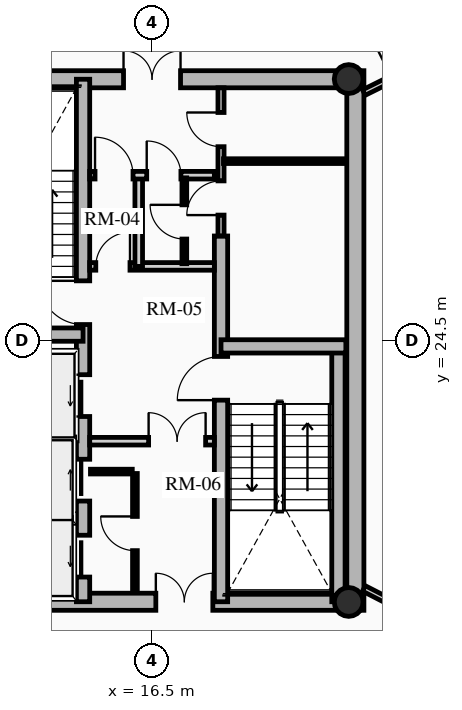
"""IFC4 building model, lengths in metres.
Left out: names, types, materials, properties, quantities, classifications, styles, units other than length and angle.
Written with IfcOpenShell. Run it as: python <this file> out.ifc"""

import sys

from ifc_helpers import new_model, si_unit, direction, frame, frame_2d, origin, origin_2d, place, context, subcontext, project, spatial, rectangle, hollow_circle, extrude, source, transform, mapped, element, fill, save


model = new_model("IFC4")
c1 = context("Model", 3, precision=1e-05, world=origin(), true_north=direction((0.0, 1.0)))
c2 = subcontext(c1, "Body", "Model", "MODEL_VIEW")
j1 = project(units=[si_unit("LENGTHUNIT", "METRE"), si_unit("PLANEANGLEUNIT", "RADIAN")], contexts=[c1])
p1 = place(None, origin())
s1 = spatial("IfcSite", under=j1, at=p1, CompositionType="ELEMENT")
p2 = place(p1, origin())
s2 = spatial("IfcBuilding", under=s1, at=p2, CompositionType="ELEMENT")
p3 = place(p2, frame((0.0, 0.0, 140.32)))
s3 = spatial("IfcBuildingStorey", under=s2, at=p3, CompositionType="ELEMENT", Elevation=140.32)
p4 = place(p3, frame((21.85, 17.4, 0.0), z_axis=(0.0, 0.0, 1.0), x_axis=(0.0, 1.0, 0.0)))
e1 = element("IfcWall", 1, at=p4, inside=s3, PredefinedType="SHEAR", context=c2, shape_type="SweptSolid", body=[
    extrude(rectangle(XDim=14.2, YDim=0.45, at=frame_2d((7.1, 0.0))), origin(), (0.0, 0.0, 1.0), 3.72),
])
p5 = place(p3, frame((11.15, 17.625, 0.0), z_axis=(0.0, 0.0, 1.0), x_axis=(1.0, 0.0, 0.0)))
e2 = element("IfcWall", 2, at=p5, inside=s3, PredefinedType="SHEAR", context=c2, shape_type="SweptSolid", body=[
    extrude(rectangle(XDim=10.7, YDim=0.45, at=frame_2d((5.35, 0.0))), origin(), (0.0, 0.0, 1.0), 3.72),
])
m1 = source(origin(), c2, "Body", "SweptSolid", [
    extrude(rectangle(XDim=1.5, YDim=2.02, at=frame_2d((0.75, 1.01))), frame((0.0, 0.235, 0.0), z_axis=(0.0, -1.0, 0.0), x_axis=(1.0, 0.0, 0.0)), (0.0, 0.0, 1.0), 0.47),
])
p6 = place(p5, frame((5.45, 0.0, 0.0)))
e3 = element("IfcOpeningElement", 3, at=p6, cuts=e2, PredefinedType="OPENING", context=c2, shape_type="MappedRepresentation", body=[
    mapped(m1, transform((0.0, 0.0, 0.0), x_axis=(1.0, 0.0, 0.0), y_axis=(0.0, 1.0, 0.0), z_axis=(0.0, 0.0, 1.0), scale=1.0)),
])
p7 = place(p3, frame((11.15, 31.375, 0.0), z_axis=(0.0, 0.0, 1.0), x_axis=(1.0, 0.0, 0.0)))
e4 = element("IfcWall", 4, at=p7, inside=s3, PredefinedType="SHEAR", context=c2, shape_type="SweptSolid", body=[
    extrude(rectangle(XDim=10.7, YDim=0.45, at=frame_2d((5.35, 0.0))), origin(), (0.0, 0.0, 1.0), 3.72),
])
p8 = place(p7, frame((4.6, 0.0, 0.0)))
e5 = element("IfcOpeningElement", 5, at=p8, cuts=e4, PredefinedType="OPENING", context=c2, shape_type="MappedRepresentation", body=[
    mapped(m1, transform((0.0, 0.0, 0.0), x_axis=(1.0, 0.0, 0.0), y_axis=(0.0, 1.0, 0.0), z_axis=(0.0, 0.0, 1.0), scale=1.0)),
])
p9 = place(p3, frame((14.685, 17.625, 0.0), z_axis=(0.0, 0.0, 1.0), x_axis=(0.0, 1.0, 0.0)))
e6 = element("IfcWall", 6, at=p9, inside=s3, PredefinedType="SHEAR", context=c2, shape_type="SweptSolid", body=[
    extrude(rectangle(XDim=13.75, YDim=0.35, at=frame_2d((6.875, 0.0))), origin(), (0.0, 0.0, 1.0), 3.72),
])
m2 = source(origin(), c2, "Body", "SweptSolid", [
    extrude(rectangle(XDim=1.1, YDim=2.015, at=frame_2d((0.55, 1.007))), frame((0.0, 0.185, 0.0), z_axis=(0.0, -1.0, 0.0), x_axis=(1.0, 0.0, 0.0)), (0.0, 0.0, 1.0), 0.37),
])
p10 = place(p9, frame((4.875, 0.0, 0.0)))
e7 = element("IfcOpeningElement", 7, at=p10, cuts=e6, PredefinedType="OPENING", context=c2, shape_type="MappedRepresentation", body=[
    mapped(m2, transform((0.0, 0.0, 0.0), x_axis=(1.0, 0.0, 0.0), y_axis=(0.0, 1.0, 0.0), z_axis=(0.0, 0.0, 1.0), scale=1.0)),
])
p11 = place(p9, frame((0.65, 0.0, 0.0)))
e8 = element("IfcOpeningElement", 8, at=p11, cuts=e6, PredefinedType="OPENING", context=c2, shape_type="MappedRepresentation", body=[
    mapped(m2, transform((0.0, 0.0, 0.0), x_axis=(1.0, 0.0, 0.0), y_axis=(0.0, 1.0, 0.0), z_axis=(0.0, 0.0, 1.0), scale=1.0)),
])
p12 = place(p9, frame((2.65, 0.0, 0.0)))
e9 = element("IfcOpeningElement", 9, at=p12, cuts=e6, PredefinedType="OPENING", context=c2, shape_type="MappedRepresentation", body=[
    mapped(m2, transform((0.0, 0.0, 0.0), x_axis=(1.0, 0.0, 0.0), y_axis=(0.0, 1.0, 0.0), z_axis=(0.0, 0.0, 1.0), scale=1.0)),
])
m3 = source(origin(), c2, "Body", "SweptSolid", [
    extrude(rectangle(XDim=1.15, YDim=2.02, at=frame_2d((0.575, 1.01))), frame((0.0, 0.185, 0.0), z_axis=(0.0, -1.0, 0.0), x_axis=(1.0, 0.0, 0.0)), (0.0, 0.0, 1.0), 0.37),
])
p13 = place(p9, frame((7.295, 0.0, 0.0)))
e10 = element("IfcOpeningElement", 10, at=p13, cuts=e6, PredefinedType="OPENING", context=c2, shape_type="MappedRepresentation", body=[
    mapped(m3, transform((0.0, 0.0, 0.0), x_axis=(1.0, 0.0, 0.0), y_axis=(0.0, 1.0, 0.0), z_axis=(0.0, 0.0, 1.0), scale=1.0)),
])
p14 = place(p3, frame((18.315, 17.625, 0.0), z_axis=(0.0, 0.0, 1.0), x_axis=(0.0, 1.0, 0.0)))
e11 = element("IfcWall", 11, at=p14, inside=s3, PredefinedType="SHEAR", context=c2, shape_type="SweptSolid", body=[
    extrude(rectangle(XDim=9.625, YDim=0.35, at=frame_2d((4.812, 0.0))), origin(), (0.0, 0.0, 1.0), 3.72),
])
p15 = place(p14, frame((5.305, 0.0, 0.0)))
e12 = element("IfcOpeningElement", 12, at=p15, cuts=e11, PredefinedType="OPENING", context=c2, shape_type="MappedRepresentation", body=[
    mapped(m3, transform((0.0, 0.0, 0.0), x_axis=(1.0, 0.0, 0.0), y_axis=(0.0, 1.0, 0.0), z_axis=(0.0, 0.0, 1.0), scale=1.0)),
])
p16 = place(p3, frame((11.4, 24.655, 0.0), z_axis=(0.0, 0.0, 1.0), x_axis=(1.0, 0.0, 0.0)))
e13 = element("IfcWall", 13, at=p16, inside=s3, PredefinedType="SHEAR", context=c2, shape_type="SweptSolid", body=[
    extrude(rectangle(XDim=3.285, YDim=0.35, at=frame_2d((1.643, 0.0))), origin(), (0.0, 0.0, 1.0), 3.72),
])
p17 = place(p3, frame((21.405, 17.625, 0.0), z_axis=(0.0, 0.0, 1.0), x_axis=(0.0, 1.0, 0.0)))
e14 = element("IfcWall", 14, at=p17, inside=s3, PredefinedType="SHEAR", context=c2, shape_type="SweptSolid", body=[
    extrude(rectangle(XDim=6.72, YDim=0.35, at=frame_2d((3.36, 0.0))), origin(), (0.0, 0.0, 1.0), 3.72),
])
p18 = place(p3, frame((18.315, 24.345, 0.0), z_axis=(0.0, 0.0, 1.0), x_axis=(1.0, 0.0, 0.0)))
e15 = element("IfcWall", 15, at=p18, inside=s3, PredefinedType="SHEAR", context=c2, shape_type="SweptSolid", body=[
    extrude(rectangle(XDim=3.285, YDim=0.35, at=frame_2d((1.643, 0.0))), origin(), (0.0, 0.0, 1.0), 3.72),
])
for number, where, z_axis, x_axis in (
    (16, (21.675, 17.62, 0.0), (0.0, 0.0, 1.0), (1.0, 0.0, 0.0)),
    (17, (21.675, 31.38, 0.0), (0.0, 0.0, 1.0), (1.0, 0.0, 0.0)),
):
    element("IfcColumn", number, at=place(p3, frame(where, z_axis=z_axis, x_axis=x_axis)), inside=s3, PredefinedType="COLUMN", context=c2, shape_type="SweptSolid", body=[
        extrude(hollow_circle(Radius=0.38, WallThickness=0.032, at=origin_2d()), origin(), (0.0, 0.0, 1.0), 3.72),
    ])
for number, where, z_axis, x_axis in (
    (18, (11.52, 21.8, 0.0), (0.0, 0.0, 1.0), (1.0, 0.0, 0.0)),
    (19, (11.52, 19.825, 0.0), (0.0, 0.0, 1.0), (1.0, 0.0, 0.0)),
):
    element("IfcWall", number, at=place(p3, frame(where, z_axis=z_axis, x_axis=x_axis)), inside=s3, PredefinedType="SHEAR", context=c2, shape_type="SweptSolid", body=[
        extrude(rectangle(XDim=2.97, YDim=0.2, at=frame_2d((1.485, 0.0))), origin(), (0.0, 0.0, 1.0), 3.72),
    ])
p19 = place(p3, frame((14.86, 21.85, 0.0), z_axis=(0.0, 0.0, 1.0), x_axis=(1.0, 0.0, 0.0)))
e20 = element("IfcWall", 20, at=p19, inside=s3, PredefinedType="PARTITIONING", context=c2, shape_type="SweptSolid", body=[
    extrude(rectangle(XDim=3.28, YDim=0.2, at=frame_2d((1.64, 0.0))), origin(), (0.0, 0.0, 1.0), 3.465),
])
m4 = source(origin(), c2, "Body", "SweptSolid", [
    extrude(rectangle(XDim=1.5, YDim=2.02, at=frame_2d((0.75, 1.01))), frame((0.0, 0.11, 0.0), z_axis=(0.0, -1.0, 0.0), x_axis=(1.0, 0.0, 0.0)), (0.0, 0.0, 1.0), 0.22),
])
p20 = place(p19, frame((1.55, 0.0, 0.0)))
e21 = element("IfcOpeningElement", 21, at=p20, cuts=e20, PredefinedType="OPENING", context=c2, shape_type="MappedRepresentation", body=[
    mapped(m4, transform((0.0, 0.0, 0.0), x_axis=(1.0, 0.0, 0.0), y_axis=(0.0, 1.0, 0.0), z_axis=(0.0, 0.0, 1.0), scale=1.0)),
])
p21 = place(p3, frame((14.86, 26.45, 0.0), z_axis=(0.0, 0.0, 1.0), x_axis=(1.0, 0.0, 0.0)))
e22 = element("IfcWall", 22, at=p21, inside=s3, PredefinedType="PARTITIONING", context=c2, shape_type="SweptSolid", body=[
    extrude(rectangle(XDim=3.28, YDim=0.2, at=frame_2d((1.64, 0.0))), origin(), (0.0, 0.0, 1.0), 3.465),
])
m5 = source(origin(), c2, "Body", "SweptSolid", [
    extrude(rectangle(XDim=0.9, YDim=2.005, at=frame_2d((0.45, 1.002))), frame((0.0, 0.11, 0.0), z_axis=(0.0, -1.0, 0.0), x_axis=(1.0, 0.0, 0.0)), (0.0, 0.0, 1.0), 0.22),
])
p22 = place(p21, frame((0.16, 0.0, 0.0)))
e23 = element("IfcOpeningElement", 23, at=p22, cuts=e22, PredefinedType="OPENING", context=c2, shape_type="MappedRepresentation", body=[
    mapped(m5, transform((0.0, 0.0, 0.0), x_axis=(1.0, 0.0, 0.0), y_axis=(0.0, 1.0, 0.0), z_axis=(0.0, 0.0, 1.0), scale=1.0)),
])
p23 = place(p3, frame((16.15, 26.45, 0.0), z_axis=(0.0, 0.0, 1.0), x_axis=(0.0, 1.0, 0.0)))
e24 = element("IfcWall", 24, at=p23, inside=s3, PredefinedType="PARTITIONING", context=c2, shape_type="SweptSolid", body=[
    extrude(rectangle(XDim=2.4, YDim=0.2, at=frame_2d((1.2, 0.0))), origin(), (0.0, 0.0, 1.0), 3.465),
])
p24 = place(p3, frame((14.86, 28.85, 0.0), z_axis=(0.0, 0.0, 1.0), x_axis=(1.0, 0.0, 0.0)))
e25 = element("IfcWall", 25, at=p24, inside=s3, PredefinedType="PARTITIONING", context=c2, shape_type="SweptSolid", body=[
    extrude(rectangle(XDim=3.28, YDim=0.2, at=frame_2d((1.64, 0.0))), origin(), (0.0, 0.0, 1.0), 3.465),
])
m6 = source(origin(), c2, "Body", "SweptSolid", [
    extrude(rectangle(XDim=1.0, YDim=2.015, at=frame_2d((0.5, 1.007))), frame((0.0, 0.11, 0.0), z_axis=(0.0, -1.0, 0.0), x_axis=(1.0, 0.0, 0.0)), (0.0, 0.0, 1.0), 0.22),
])
p25 = place(p24, frame((0.14, 0.0, 0.0)))
e26 = element("IfcOpeningElement", 26, at=p25, cuts=e25, PredefinedType="OPENING", context=c2, shape_type="MappedRepresentation", body=[
    mapped(m6, transform((0.0, 0.0, 0.0), x_axis=(1.0, 0.0, 0.0), y_axis=(0.0, 1.0, 0.0), z_axis=(0.0, 0.0, 1.0), scale=1.0)),
])
p26 = place(p24, frame((1.5, 0.0, 0.0)))
e27 = element("IfcOpeningElement", 27, at=p26, cuts=e25, PredefinedType="OPENING", context=c2, shape_type="MappedRepresentation", body=[
    mapped(m5, transform((0.0, 0.0, 0.0), x_axis=(1.0, 0.0, 0.0), y_axis=(0.0, 1.0, 0.0), z_axis=(0.0, 0.0, 1.0), scale=1.0)),
])
p27 = place(p3, frame((16.05, 17.92, 0.0), z_axis=(0.0, 0.0, 1.0), x_axis=(0.0, 1.0, 0.0)))
e28 = element("IfcWall", 28, at=p27, inside=s3, PredefinedType="PARTITIONING", context=c2, shape_type="SweptSolid", body=[
    extrude(rectangle(XDim=3.08, YDim=0.125, at=frame_2d((1.54, 0.0))), origin(), (0.0, 0.0, 1.0), 3.465),
])
m7 = source(origin(), c2, "Body", "SweptSolid", [
    extrude(rectangle(XDim=0.9, YDim=2.005, at=frame_2d((0.45, 1.002))), frame((0.0, 0.073, 0.0), z_axis=(0.0, -1.0, 0.0), x_axis=(1.0, 0.0, 0.0)), (0.0, 0.0, 1.0), 0.145),
])
p28 = place(p27, frame((1.05, 0.0, 0.0)))
e29 = element("IfcOpeningElement", 29, at=p28, cuts=e28, PredefinedType="OPENING", context=c2, shape_type="MappedRepresentation", body=[
    mapped(m7, transform((0.0, 0.0, 0.0), x_axis=(1.0, 0.0, 0.0), y_axis=(0.0, 1.0, 0.0), z_axis=(0.0, 0.0, 1.0), scale=1.0)),
])
p29 = place(p3, frame((14.88, 21.05, 0.0), z_axis=(0.0, 0.0, 1.0), x_axis=(1.0, 0.0, 0.0)))
e30 = element("IfcWall", 30, at=p29, inside=s3, PredefinedType="PARTITIONING", context=c2, shape_type="SweptSolid", body=[
    extrude(rectangle(XDim=1.1, YDim=0.125, at=frame_2d((0.55, 0.0))), origin(), (0.0, 0.0, 1.0), 3.465),
])
p30 = place(p3, frame((17.35, 26.52, 0.0), z_axis=(0.0, 0.0, 1.0), x_axis=(0.0, 1.0, 0.0)))
e31 = element("IfcWall", 31, at=p30, inside=s3, PredefinedType="PARTITIONING", context=c2, shape_type="SweptSolid", body=[
    extrude(rectangle(XDim=2.26, YDim=0.125, at=frame_2d((1.13, 0.0))), origin(), (0.0, 0.0, 1.0), 3.465),
])
p31 = place(p30, frame((0.65, 0.0, 0.0)))
e32 = element("IfcOpeningElement", 32, at=p31, cuts=e31, PredefinedType="OPENING", context=c2, shape_type="MappedRepresentation", body=[
    mapped(m7, transform((0.0, 0.0, 0.0), x_axis=(1.0, 0.0, 0.0), y_axis=(0.0, 1.0, 0.0), z_axis=(0.0, 0.0, 1.0), scale=1.0)),
])
p32 = place(p3, frame((18.315, 27.25, 0.0), z_axis=(0.0, 0.0, 1.0), x_axis=(0.0, 1.0, 0.0)))
e33 = element("IfcWall", 33, at=p32, inside=s3, PredefinedType="PARTITIONING", context=c2, shape_type="SweptSolid", body=[
    extrude(rectangle(XDim=3.9, YDim=0.16, at=frame_2d((1.95, 0.0))), origin(), (0.0, 0.0, 1.0), 3.465),
])
m8 = source(origin(), c2, "Body", "SweptSolid", [
    extrude(rectangle(XDim=0.9, YDim=2.005, at=frame_2d((0.45, 1.002))), frame((0.0, 0.09, 0.0), z_axis=(0.0, -1.0, 0.0), x_axis=(1.0, 0.0, 0.0)), (0.0, 0.0, 1.0), 0.18),
])
p33 = place(p32, frame((0.55, 0.0, 0.0)))
e34 = element("IfcOpeningElement", 34, at=p33, cuts=e33, PredefinedType="OPENING", context=c2, shape_type="MappedRepresentation", body=[
    mapped(m8, transform((0.0, 0.0, 0.0), x_axis=(1.0, 0.0, 0.0), y_axis=(0.0, 1.0, 0.0), z_axis=(0.0, 0.0, 1.0), scale=1.0)),
])
p34 = place(p32, frame((2.35, 0.0, 0.0)))
e35 = element("IfcOpeningElement", 35, at=p34, cuts=e33, PredefinedType="OPENING", context=c2, shape_type="MappedRepresentation", body=[
    mapped(m8, transform((0.0, 0.0, 0.0), x_axis=(1.0, 0.0, 0.0), y_axis=(0.0, 1.0, 0.0), z_axis=(0.0, 0.0, 1.0), scale=1.0)),
])
p35 = place(p3, frame((18.38, 29.22, 0.0), z_axis=(0.0, 0.0, 1.0), x_axis=(1.0, 0.0, 0.0)))
e36 = element("IfcWall", 36, at=p35, inside=s3, PredefinedType="PARTITIONING", context=c2, shape_type="SweptSolid", body=[
    extrude(rectangle(XDim=3.22, YDim=0.125, at=frame_2d((1.61, 0.0))), origin(), (0.0, 0.0, 1.0), 3.002),
])
p36 = place(p3, frame((22.075, 31.025, 0.0), z_axis=(0.0, 0.0, 1.0), x_axis=(0.8959286695, 0.444197950432, 0.0)))
e37 = element("IfcWall", 37, at=p36, inside=s3, PredefinedType="PARTITIONING", context=c2, shape_type="SweptSolid", body=[
    extrude(rectangle(XDim=2.074, YDim=0.16, at=frame_2d((1.037, 0.0))), origin(), (0.0, 0.0, 1.0), 3.035),
])
m9 = source(origin(), c2, "Body", "SweptSolid", [
    extrude(rectangle(XDim=1.05, YDim=2.015, at=frame_2d((0.525, 1.007))), frame((0.0, 0.09, 0.0), z_axis=(0.0, -1.0, 0.0), x_axis=(1.0, 0.0, 0.0)), (0.0, 0.0, 1.0), 0.18),
])
p37 = place(p36, frame((0.824, 0.0, 0.0)))
e38 = element("IfcOpeningElement", 38, at=p37, cuts=e37, PredefinedType="OPENING", context=c2, shape_type="MappedRepresentation", body=[
    mapped(m9, transform((0.0, 0.0, 0.0), x_axis=(1.0, 0.0, 0.0), y_axis=(0.0, 1.0, 0.0), z_axis=(0.0, 0.0, 1.0), scale=1.0)),
])
p38 = place(p3, frame((22.075, 17.975, 0.0), z_axis=(0.0, 0.0, 1.0), x_axis=(0.889835034782, -0.456282380632, 0.0)))
e39 = element("IfcWall", 39, at=p38, inside=s3, PredefinedType="PARTITIONING", context=c2, shape_type="SweptSolid", body=[
    extrude(rectangle(XDim=2.17, YDim=0.16, at=frame_2d((1.085, 0.0))), origin(), (0.0, 0.0, 1.0), 3.035),
])
p39 = place(p38, frame((0.92, 0.0, 0.0)))
e40 = element("IfcOpeningElement", 40, at=p39, cuts=e39, PredefinedType="OPENING", context=c2, shape_type="MappedRepresentation", body=[
    mapped(m9, transform((0.0, 0.0, 0.0), x_axis=(1.0, 0.0, 0.0), y_axis=(0.0, 1.0, 0.0), z_axis=(0.0, 0.0, 1.0), scale=1.0)),
])
m10 = source(origin(), c2, "Body", "SweptSolid", [
    extrude(rectangle(XDim=1.1, YDim=2.015, at=frame_2d((0.55, 1.007))), frame((0.0, 0.025, 0.0), z_axis=(0.0, -1.0, 0.0), x_axis=(1.0, 0.0, 0.0)), (0.0, 0.0, 1.0), 0.05),
])
p40 = place(p10, origin())
e41 = element("IfcDoor", 41, at=p40, inside=s3, OperationType="SLIDING_TO_LEFT", PredefinedType="DOOR", context=c2, shape_type="MappedRepresentation", body=[
    mapped(m10, transform((0.0, 0.0, 0.0), x_axis=(1.0, 0.0, 0.0), y_axis=(0.0, 1.0, 0.0), z_axis=(0.0, 0.0, 1.0), scale=1.0)),
])
fill(e7, e41)
p41 = place(p11, origin())
e42 = element("IfcDoor", 42, at=p41, inside=s3, OperationType="SLIDING_TO_LEFT", PredefinedType="DOOR", context=c2, shape_type="MappedRepresentation", body=[
    mapped(m10, transform((0.0, 0.0, 0.0), x_axis=(1.0, 0.0, 0.0), y_axis=(0.0, 1.0, 0.0), z_axis=(0.0, 0.0, 1.0), scale=1.0)),
])
fill(e8, e42)
p42 = place(p12, origin())
e43 = element("IfcDoor", 43, at=p42, inside=s3, OperationType="SLIDING_TO_RIGHT", PredefinedType="DOOR", context=c2, shape_type="MappedRepresentation", body=[
    mapped(m10, transform((0.0, 0.0, 0.0), x_axis=(1.0, 0.0, 0.0), y_axis=(0.0, 1.0, 0.0), z_axis=(0.0, 0.0, 1.0), scale=1.0)),
])
fill(e9, e43)
m11 = source(origin(), c2, "Body", "SweptSolid", [
    extrude(rectangle(XDim=1.15, YDim=2.02, at=frame_2d((0.575, 1.01))), frame((0.0, 0.025, 0.0), z_axis=(0.0, -1.0, 0.0), x_axis=(1.0, 0.0, 0.0)), (0.0, 0.0, 1.0), 0.05),
])
p43 = place(p13, origin())
e44 = element("IfcDoor", 44, at=p43, inside=s3, OperationType="SINGLE_SWING_RIGHT", PredefinedType="DOOR", context=c2, shape_type="MappedRepresentation", body=[
    mapped(m11, transform((0.0, 0.0, 0.0), x_axis=(1.0, 0.0, 0.0), y_axis=(0.0, 1.0, 0.0), z_axis=(0.0, 0.0, 1.0), scale=1.0)),
])
fill(e10, e44)
p44 = place(p15, origin())
e45 = element("IfcDoor", 45, at=p44, inside=s3, OperationType="SINGLE_SWING_LEFT", PredefinedType="DOOR", context=c2, shape_type="MappedRepresentation", body=[
    mapped(m11, transform((0.0, 0.0, 0.0), x_axis=(1.0, 0.0, 0.0), y_axis=(0.0, 1.0, 0.0), z_axis=(0.0, 0.0, 1.0), scale=1.0)),
])
fill(e12, e45)
m12 = source(origin(), c2, "Body", "SweptSolid", [
    extrude(rectangle(XDim=1.5, YDim=2.02, at=frame_2d((0.75, 1.01))), frame((0.0, 0.025, 0.0), z_axis=(0.0, -1.0, 0.0), x_axis=(1.0, 0.0, 0.0)), (0.0, 0.0, 1.0), 0.05),
])
p45 = place(p8, origin())
e46 = element("IfcDoor", 46, at=p45, inside=s3, OperationType="DOUBLE_DOOR_SINGLE_SWING", PredefinedType="DOOR", context=c2, shape_type="MappedRepresentation", body=[
    mapped(m12, transform((0.0, 0.0, 0.0), x_axis=(1.0, 0.0, 0.0), y_axis=(0.0, 1.0, 0.0), z_axis=(0.0, 0.0, 1.0), scale=1.0)),
])
fill(e5, e46)
p46 = place(p6, origin())
e47 = element("IfcDoor", 47, at=p46, inside=s3, OperationType="DOUBLE_DOOR_SINGLE_SWING", PredefinedType="DOOR", context=c2, shape_type="MappedRepresentation", body=[
    mapped(m12, transform((0.0, 0.0, 0.0), x_axis=(1.0, 0.0, 0.0), y_axis=(0.0, 1.0, 0.0), z_axis=(0.0, 0.0, 1.0), scale=1.0)),
])
fill(e3, e47)
p47 = place(p20, origin())
e48 = element("IfcDoor", 48, at=p47, inside=s3, OperationType="DOUBLE_DOOR_SINGLE_SWING", PredefinedType="DOOR", context=c2, shape_type="MappedRepresentation", body=[
    mapped(m12, transform((0.0, 0.0, 0.0), x_axis=(1.0, 0.0, 0.0), y_axis=(0.0, 1.0, 0.0), z_axis=(0.0, 0.0, 1.0), scale=1.0)),
])
fill(e21, e48)
m13 = source(origin(), c2, "Body", "SweptSolid", [
    extrude(rectangle(XDim=0.9, YDim=2.005, at=frame_2d((0.45, 1.002))), frame((0.0, 0.025, 0.0), z_axis=(0.0, -1.0, 0.0), x_axis=(1.0, 0.0, 0.0)), (0.0, 0.0, 1.0), 0.05),
])
p48 = place(p22, origin())
e49 = element("IfcDoor", 49, at=p48, inside=s3, OperationType="SINGLE_SWING_RIGHT", PredefinedType="DOOR", context=c2, shape_type="MappedRepresentation", body=[
    mapped(m13, transform((0.0, 0.0, 0.0), x_axis=(1.0, 0.0, 0.0), y_axis=(0.0, 1.0, 0.0), z_axis=(0.0, 0.0, 1.0), scale=1.0)),
])
fill(e23, e49)
m14 = source(origin(), c2, "Body", "SweptSolid", [
    extrude(rectangle(XDim=1.0, YDim=2.015, at=frame_2d((0.5, 1.007))), frame((0.0, 0.025, 0.0), z_axis=(0.0, -1.0, 0.0), x_axis=(1.0, 0.0, 0.0)), (0.0, 0.0, 1.0), 0.05),
])
p49 = place(p25, origin())
e50 = element("IfcDoor", 50, at=p49, inside=s3, OperationType="SINGLE_SWING_LEFT", PredefinedType="DOOR", context=c2, shape_type="MappedRepresentation", body=[
    mapped(m14, transform((0.0, 0.0, 0.0), x_axis=(1.0, 0.0, 0.0), y_axis=(0.0, 1.0, 0.0), z_axis=(0.0, 0.0, 1.0), scale=1.0)),
])
fill(e26, e50)
p50 = place(p28, origin())
e51 = element("IfcDoor", 51, at=p50, inside=s3, OperationType="SINGLE_SWING_RIGHT", PredefinedType="DOOR", context=c2, shape_type="MappedRepresentation", body=[
    mapped(m13, transform((0.0, 0.0, 0.0), x_axis=(1.0, 0.0, 0.0), y_axis=(0.0, 1.0, 0.0), z_axis=(0.0, 0.0, 1.0), scale=1.0)),
])
fill(e29, e51)
p51 = place(p26, origin())
e52 = element("IfcDoor", 52, at=p51, inside=s3, OperationType="SINGLE_SWING_LEFT", PredefinedType="DOOR", context=c2, shape_type="MappedRepresentation", body=[
    mapped(m13, transform((0.0, 0.0, 0.0), x_axis=(1.0, 0.0, 0.0), y_axis=(0.0, 1.0, 0.0), z_axis=(0.0, 0.0, 1.0), scale=1.0)),
])
fill(e27, e52)
p52 = place(p31, origin())
e53 = element("IfcDoor", 53, at=p52, inside=s3, OperationType="SINGLE_SWING_RIGHT", PredefinedType="DOOR", context=c2, shape_type="MappedRepresentation", body=[
    mapped(m13, transform((0.0, 0.0, 0.0), x_axis=(1.0, 0.0, 0.0), y_axis=(0.0, 1.0, 0.0), z_axis=(0.0, 0.0, 1.0), scale=1.0)),
])
fill(e32, e53)
p53 = place(p33, origin())
e54 = element("IfcDoor", 54, at=p53, inside=s3, OperationType="SINGLE_SWING_LEFT", PredefinedType="DOOR", context=c2, shape_type="MappedRepresentation", body=[
    mapped(m13, transform((0.0, 0.0, 0.0), x_axis=(1.0, 0.0, 0.0), y_axis=(0.0, 1.0, 0.0), z_axis=(0.0, 0.0, 1.0), scale=1.0)),
])
fill(e34, e54)
p54 = place(p34, origin())
e55 = element("IfcDoor", 55, at=p54, inside=s3, OperationType="SINGLE_SWING_RIGHT", PredefinedType="DOOR", context=c2, shape_type="MappedRepresentation", body=[
    mapped(m13, transform((0.0, 0.0, 0.0), x_axis=(1.0, 0.0, 0.0), y_axis=(0.0, 1.0, 0.0), z_axis=(0.0, 0.0, 1.0), scale=1.0)),
])
fill(e35, e55)
save(model, sys.argv[1])
